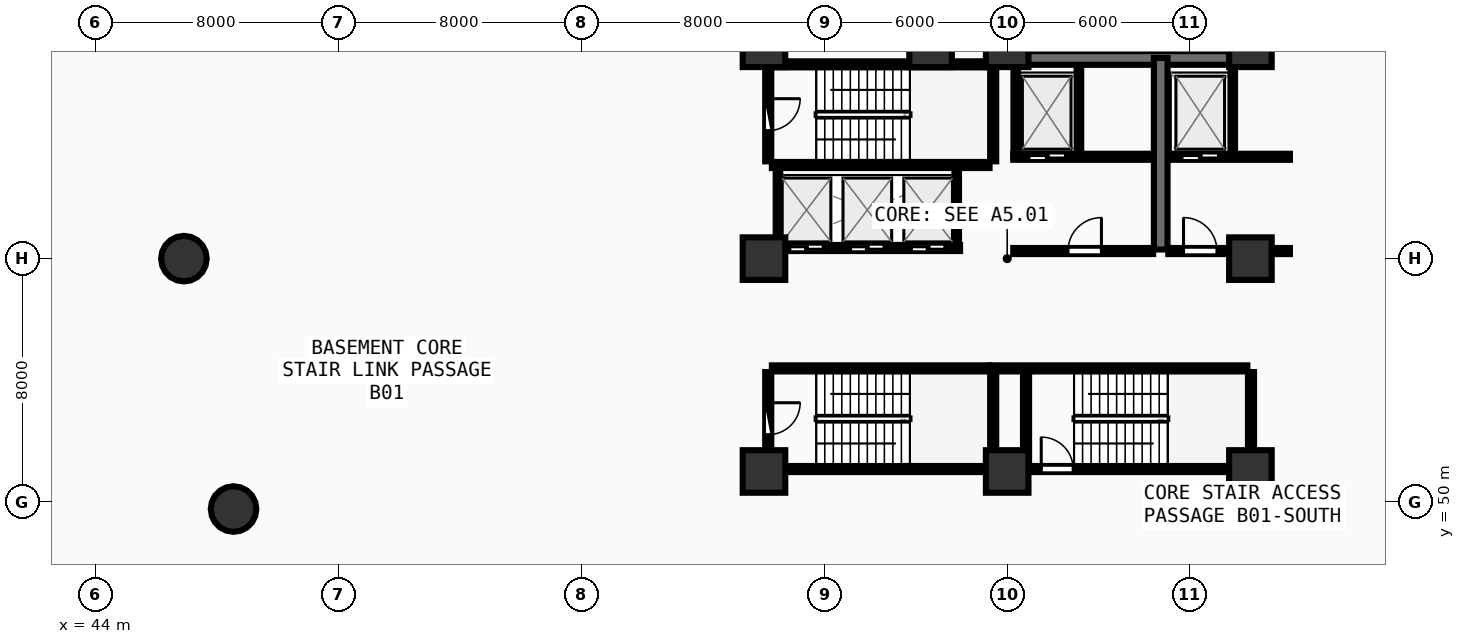
"""IFC4 building model, lengths in metres.
Left out: names, types, materials, properties, quantities, classifications, styles, units other than length and angle.
Written with IfcOpenShell. Run it as: python <this file> out.ifc"""

import sys

from ifc_helpers import new_model, si_unit, direction, frame, frame_2d, origin, origin_2d, place, context, subcontext, project, spatial, rectangle, circle, extrude, element, fill, save


model = new_model("IFC4")
c1 = context("Model", 3, precision=1e-05, world=origin(), true_north=direction((0.0, 1.0)))
c2 = subcontext(c1, "Body", "Model", "MODEL_VIEW")
j1 = project(units=[si_unit("LENGTHUNIT", "METRE"), si_unit("PLANEANGLEUNIT", "RADIAN")], contexts=[c1])
p1 = place(None, origin())
s1 = spatial("IfcSite", under=j1, at=p1, CompositionType="ELEMENT")
p2 = place(p1, origin())
s2 = spatial("IfcBuilding", under=s1, at=p2, CompositionType="ELEMENT")
p3 = place(p2, frame((0.0, 0.0, -4.2)))
s3 = spatial("IfcBuildingStorey", under=s2, at=p3, CompositionType="ELEMENT", Elevation=-4.2)
for number, where, z_axis, x_axis in (
    (1, (66.0, 51.0, 0.0), (0.0, 0.0, 1.0), (1.0, 0.0, 0.0)),
    (2, (74.0, 51.0, 0.0), (0.0, 0.0, 1.0), (1.0, 0.0, 0.0)),
    (3, (82.0, 51.0, 0.0), (0.0, 0.0, 1.0), (1.0, 0.0, 0.0)),
    (4, (82.0, 58.0, 0.0), (0.0, 0.0, 1.0), (1.0, 0.0, 0.0)),
    (5, (82.0, 65.0, 0.0), (0.0, 0.0, 1.0), (1.0, 0.0, 0.0)),
    (6, (74.0, 65.0, 0.0), (0.0, 0.0, 1.0), (1.0, 0.0, 0.0)),
    (7, (71.48, 65.0, 0.0), (0.0, 0.0, 1.0), (1.0, 0.0, 0.0)),
    (8, (66.0, 65.0, 0.0), (0.0, 0.0, 1.0), (1.0, 0.0, 0.0)),
    (9, (66.0, 58.0, 0.0), (0.0, 0.0, 1.0), (1.0, 0.0, 0.0)),
):
    element("IfcColumn", number, at=place(p3, frame(where, z_axis=z_axis, x_axis=x_axis)), inside=s3, PredefinedType="PILASTER", context=c2, shape_type="SweptSolid", body=[
        extrude(rectangle(XDim=1.4, YDim=1.4, at=origin_2d()), origin(), (0.0, 0.0, 1.0), 4.2),
    ])
for number, where, z_axis, x_axis in (
    (10, (46.92, 58.0, 0.0), (0.0, 0.0, 1.0), (1.0, 0.0, 0.0)),
    (11, (48.553, 49.764, 0.0), (0.0, 0.0, 1.0), (1.0, 0.0, 0.0)),
):
    element("IfcColumn", number, at=place(p3, frame(where, z_axis=z_axis, x_axis=x_axis)), inside=s3, PredefinedType="COLUMN", context=c2, shape_type="SweptSolid", body=[
        extrude(circle(Radius=0.75, at=origin_2d()), origin(), (0.0, 0.0, 1.0), 4.2),
    ])
p4 = place(p3, frame((66.26, 61.08, 0.0), z_axis=(0.0, 0.0, 1.0), x_axis=(1.0, 0.0, 0.0)))
e12 = element("IfcWall", 12, at=p4, inside=s3, PredefinedType="SHEAR", context=c2, shape_type="SweptSolid", body=[
    extrude(rectangle(XDim=7.16, YDim=0.2, at=frame_2d((3.58, 0.0))), origin(), (0.0, 0.0, 1.0), 3.9),
])
p5 = place(p3, frame((73.54, 61.2, 0.0), z_axis=(0.0, 0.0, 1.0), x_axis=(0.0, 1.0, 0.0)))
e13 = element("IfcWall", 13, at=p5, inside=s3, PredefinedType="SHEAR", context=c2, shape_type="SweptSolid", body=[
    extrude(rectangle(XDim=3.07, YDim=0.2, at=frame_2d((1.535, 0.0))), origin(), (0.0, 0.0, 1.0), 3.9),
])
p6 = place(p3, frame((73.42, 64.39, 0.0), z_axis=(0.0, 0.0, 1.0), x_axis=(-1.0, 0.0, 0.0)))
e14 = element("IfcWall", 14, at=p6, inside=s3, PredefinedType="SHEAR", context=c2, shape_type="SweptSolid", body=[
    extrude(rectangle(XDim=7.16, YDim=0.2, at=frame_2d((3.58, 0.0))), origin(), (0.0, 0.0, 1.0), 3.9),
])
p7 = place(p3, frame((66.14, 64.27, 0.0), z_axis=(0.0, 0.0, 1.0), x_axis=(0.0, -1.0, 0.0)))
e15 = element("IfcWall", 15, at=p7, inside=s3, PredefinedType="SHEAR", context=c2, shape_type="SweptSolid", body=[
    extrude(rectangle(XDim=3.07, YDim=0.2, at=frame_2d((1.535, 0.0))), origin(), (0.0, 0.0, 1.0), 3.9),
])
p8 = place(p7, frame((1.01, 0.0, 0.0)))
e16 = element("IfcOpeningElement", 16, at=p8, cuts=e15, PredefinedType="OPENING", context=c2, shape_type="SweptSolid", body=[
    extrude(rectangle(XDim=1.05, YDim=2.1, at=frame_2d((0.525, 1.05))), frame((0.0, 0.11, 0.0), z_axis=(0.0, -1.0, 0.0), x_axis=(1.0, 0.0, 0.0)), (0.0, 0.0, 1.0), 0.22),
])
p9 = place(p3, frame((74.0, 51.08, 0.0), z_axis=(0.0, 0.0, 1.0), x_axis=(1.0, 0.0, 0.0)))
e17 = element("IfcWall", 17, at=p9, inside=s3, PredefinedType="SHEAR", context=c2, shape_type="SweptSolid", body=[
    extrude(rectangle(XDim=7.9, YDim=0.2, at=frame_2d((3.95, 0.0))), origin(), (0.0, 0.0, 1.0), 3.9),
])
p10 = place(p9, frame((1.12, 0.0, 0.0)))
e18 = element("IfcOpeningElement", 18, at=p10, cuts=e17, PredefinedType="OPENING", context=c2, shape_type="SweptSolid", body=[
    extrude(rectangle(XDim=1.05, YDim=2.1, at=frame_2d((0.525, 1.05))), frame((0.0, 0.11, 0.0), z_axis=(0.0, -1.0, 0.0), x_axis=(1.0, 0.0, 0.0)), (0.0, 0.0, 1.0), 0.22),
])
p11 = place(p3, frame((82.02, 51.2, 0.0), z_axis=(0.0, 0.0, 1.0), x_axis=(0.0, 1.0, 0.0)))
e19 = element("IfcWall", 19, at=p11, inside=s3, PredefinedType="SHEAR", context=c2, shape_type="SweptSolid", body=[
    extrude(rectangle(XDim=3.07, YDim=0.2, at=frame_2d((1.535, 0.0))), origin(), (0.0, 0.0, 1.0), 3.9),
])
p12 = place(p3, frame((81.9, 54.39, 0.0), z_axis=(0.0, 0.0, 1.0), x_axis=(-1.0, 0.0, 0.0)))
e20 = element("IfcWall", 20, at=p12, inside=s3, PredefinedType="SHEAR", context=c2, shape_type="SweptSolid", body=[
    extrude(rectangle(XDim=8.46, YDim=0.2, at=frame_2d((4.23, 0.0))), origin(), (0.0, 0.0, 1.0), 3.9),
])
p13 = place(p3, frame((74.62, 54.27, 0.0), z_axis=(0.0, 0.0, 1.0), x_axis=(0.0, -1.0, 0.0)))
e21 = element("IfcWall", 21, at=p13, inside=s3, PredefinedType="SHEAR", context=c2, shape_type="SweptSolid", body=[
    extrude(rectangle(XDim=3.07, YDim=0.2, at=frame_2d((1.535, 0.0))), origin(), (0.0, 0.0, 1.0), 3.9),
])
p14 = place(p3, frame((66.26, 51.08, 0.0), z_axis=(0.0, 0.0, 1.0), x_axis=(1.0, 0.0, 0.0)))
e22 = element("IfcWall", 22, at=p14, inside=s3, PredefinedType="SHEAR", context=c2, shape_type="SweptSolid", body=[
    extrude(rectangle(XDim=7.16, YDim=0.2, at=frame_2d((3.58, 0.0))), origin(), (0.0, 0.0, 1.0), 3.9),
])
p15 = place(p3, frame((73.54, 51.2, 0.0), z_axis=(0.0, 0.0, 1.0), x_axis=(0.0, 1.0, 0.0)))
e23 = element("IfcWall", 23, at=p15, inside=s3, PredefinedType="SHEAR", context=c2, shape_type="SweptSolid", body=[
    extrude(rectangle(XDim=3.07, YDim=0.2, at=frame_2d((1.535, 0.0))), origin(), (0.0, 0.0, 1.0), 3.9),
])
p16 = place(p3, frame((73.42, 54.39, 0.0), z_axis=(0.0, 0.0, 1.0), x_axis=(-1.0, 0.0, 0.0)))
e24 = element("IfcWall", 24, at=p16, inside=s3, PredefinedType="SHEAR", context=c2, shape_type="SweptSolid", body=[
    extrude(rectangle(XDim=7.16, YDim=0.2, at=frame_2d((3.58, 0.0))), origin(), (0.0, 0.0, 1.0), 3.9),
])
p17 = place(p3, frame((66.14, 54.27, 0.0), z_axis=(0.0, 0.0, 1.0), x_axis=(0.0, -1.0, 0.0)))
e25 = element("IfcWall", 25, at=p17, inside=s3, PredefinedType="SHEAR", context=c2, shape_type="SweptSolid", body=[
    extrude(rectangle(XDim=3.07, YDim=0.2, at=frame_2d((1.535, 0.0))), origin(), (0.0, 0.0, 1.0), 3.9),
])
p18 = place(p17, frame((1.01, 0.0, 0.0)))
e26 = element("IfcOpeningElement", 26, at=p18, cuts=e25, PredefinedType="OPENING", context=c2, shape_type="SweptSolid", body=[
    extrude(rectangle(XDim=1.05, YDim=2.1, at=frame_2d((0.525, 1.05))), frame((0.0, 0.11, 0.0), z_axis=(0.0, -1.0, 0.0), x_axis=(1.0, 0.0, 0.0)), (0.0, 0.0, 1.0), 0.22),
])
p19 = place(p3, frame((74.0, 64.6, 0.0), z_axis=(0.0, 0.0, 1.0), x_axis=(1.0, 0.0, 0.0)))
e27 = element("IfcWall", 27, at=p19, inside=s3, PredefinedType="SHEAR", context=c2, shape_type="SweptSolid", body=[
    extrude(rectangle(XDim=8.0, YDim=0.45, at=frame_2d((4.0, 0.0))), origin(), (0.0, 0.0, 1.0), 3.9),
])
p20 = place(p3, frame((79.05, 58.3, 0.0), z_axis=(0.0, 0.0, 1.0), x_axis=(0.0, 1.0, 0.0)))
e28 = element("IfcWall", 28, at=p20, inside=s3, PredefinedType="SHEAR", context=c2, shape_type="SweptSolid", body=[
    extrude(rectangle(XDim=6.3, YDim=0.45, at=frame_2d((3.15, 0.0))), origin(), (0.0, 0.0, 1.0), 3.9),
])
p21 = place(p3, frame((74.2, 61.35, 0.0), z_axis=(0.0, 0.0, 1.0), x_axis=(1.0, 0.0, 0.0)))
e29 = element("IfcWall", 29, at=p21, inside=s3, PredefinedType="SOLIDWALL", context=c2, shape_type="SweptSolid", body=[
    extrude(rectangle(XDim=4.6, YDim=0.2, at=frame_2d((2.3, 0.0))), origin(), (0.0, 0.0, 1.0), 3.89),
])
p22 = place(p21, frame((0.52, 0.0, 0.0)))
e30 = element("IfcOpeningElement", 30, at=p22, cuts=e29, PredefinedType="OPENING", context=c2, shape_type="SweptSolid", body=[
    extrude(rectangle(XDim=1.2, YDim=2.15, at=frame_2d((0.6, 1.075))), frame((0.0, 0.11, 0.0), z_axis=(0.0, -1.0, 0.0), x_axis=(1.0, 0.0, 0.0)), (0.0, 0.0, 1.0), 0.22),
])
p23 = place(p3, frame((74.28, 61.35, 0.0), z_axis=(0.0, 0.0, 1.0), x_axis=(0.0, 1.0, 0.0)))
e31 = element("IfcWall", 31, at=p23, inside=s3, PredefinedType="PARTITIONING", context=c2, shape_type="SweptSolid", body=[
    extrude(rectangle(XDim=2.97, YDim=0.15, at=frame_2d((1.485, 0.0))), origin(), (0.0, 0.0, 1.0), 3.89),
])
p24 = place(p3, frame((76.36, 61.48, 0.0), z_axis=(0.0, 0.0, 1.0), x_axis=(0.0, 1.0, 0.0)))
e32 = element("IfcWall", 32, at=p24, inside=s3, PredefinedType="PARTITIONING", context=c2, shape_type="SweptSolid", body=[
    extrude(rectangle(XDim=2.84, YDim=0.15, at=frame_2d((1.42, 0.0))), origin(), (0.0, 0.0, 1.0), 3.89),
])
p25 = place(p3, frame((79.3, 61.35, 0.0), z_axis=(0.0, 0.0, 1.0), x_axis=(1.0, 0.0, 0.0)))
e33 = element("IfcWall", 33, at=p25, inside=s3, PredefinedType="SOLIDWALL", context=c2, shape_type="SweptSolid", body=[
    extrude(rectangle(XDim=4.0, YDim=0.2, at=frame_2d((2.0, 0.0))), origin(), (0.0, 0.0, 1.0), 3.185),
])
p26 = place(p25, frame((0.45, 0.0, 0.0)))
e34 = element("IfcOpeningElement", 34, at=p26, cuts=e33, PredefinedType="OPENING", context=c2, shape_type="SweptSolid", body=[
    extrude(rectangle(XDim=1.2, YDim=2.15, at=frame_2d((0.6, 1.075))), frame((0.0, 0.11, 0.0), z_axis=(0.0, -1.0, 0.0), x_axis=(1.0, 0.0, 0.0)), (0.0, 0.0, 1.0), 0.22),
])
p27 = place(p3, frame((81.42, 61.48, 0.0), z_axis=(0.0, 0.0, 1.0), x_axis=(0.0, 1.0, 0.0)))
e35 = element("IfcWall", 35, at=p27, inside=s3, PredefinedType="PARTITIONING", context=c2, shape_type="SweptSolid", body=[
    extrude(rectangle(XDim=2.84, YDim=0.15, at=frame_2d((1.42, 0.0))), origin(), (0.0, 0.0, 1.0), 3.89),
])
p28 = place(p3, frame((74.2, 58.25, 0.0), z_axis=(0.0, 0.0, 1.0), x_axis=(1.0, 0.0, 0.0)))
e36 = element("IfcWall", 36, at=p28, inside=s3, PredefinedType="SOLIDWALL", context=c2, shape_type="SweptSolid", body=[
    extrude(rectangle(XDim=4.6, YDim=0.2, at=frame_2d((2.3, 0.0))), origin(), (0.0, 0.0, 1.0), 3.89),
])
p29 = place(p28, frame((1.8, 0.0, 0.0)))
e37 = element("IfcOpeningElement", 37, at=p29, cuts=e36, PredefinedType="OPENING", context=c2, shape_type="SweptSolid", body=[
    extrude(rectangle(XDim=1.1, YDim=2.1, at=frame_2d((0.55, 1.05))), frame((0.0, 0.11, 0.0), z_axis=(0.0, -1.0, 0.0), x_axis=(1.0, 0.0, 0.0)), (0.0, 0.0, 1.0), 0.22),
])
p30 = place(p3, frame((79.3, 58.25, 0.0), z_axis=(0.0, 0.0, 1.0), x_axis=(1.0, 0.0, 0.0)))
e38 = element("IfcWall", 38, at=p30, inside=s3, PredefinedType="SOLIDWALL", context=c2, shape_type="SweptSolid", body=[
    extrude(rectangle(XDim=4.0, YDim=0.2, at=frame_2d((2.0, 0.0))), origin(), (0.0, 0.0, 1.0), 3.185),
])
p31 = place(p30, frame((0.5, 0.0, 0.0)))
e39 = element("IfcOpeningElement", 39, at=p31, cuts=e38, PredefinedType="OPENING", context=c2, shape_type="SweptSolid", body=[
    extrude(rectangle(XDim=1.1, YDim=2.1, at=frame_2d((0.55, 1.05))), frame((0.0, 0.11, 0.0), z_axis=(0.0, -1.0, 0.0), x_axis=(1.0, 0.0, 0.0)), (0.0, 0.0, 1.0), 0.22),
])
p32 = place(p3, frame((66.45, 58.35, 0.0), z_axis=(0.0, 0.0, 1.0), x_axis=(1.0, 0.0, 0.0)))
e40 = element("IfcWall", 40, at=p32, inside=s3, PredefinedType="SOLIDWALL", context=c2, shape_type="SweptSolid", body=[
    extrude(rectangle(XDim=6.0, YDim=0.2, at=frame_2d((3.0, 0.0))), origin(), (0.0, 0.0, 1.0), 3.89),
])
p33 = place(p32, frame((0.4, 0.0, 0.0)))
e41 = element("IfcOpeningElement", 41, at=p33, cuts=e40, PredefinedType="OPENING", context=c2, shape_type="SweptSolid", body=[
    extrude(rectangle(XDim=1.1, YDim=2.1, at=frame_2d((0.55, 1.05))), frame((0.0, 0.11, 0.0), z_axis=(0.0, -1.0, 0.0), x_axis=(1.0, 0.0, 0.0)), (0.0, 0.0, 1.0), 0.22),
])
p34 = place(p32, frame((2.4, 0.0, 0.0)))
e42 = element("IfcOpeningElement", 42, at=p34, cuts=e40, PredefinedType="OPENING", context=c2, shape_type="SweptSolid", body=[
    extrude(rectangle(XDim=1.1, YDim=2.1, at=frame_2d((0.55, 1.05))), frame((0.0, 0.11, 0.0), z_axis=(0.0, -1.0, 0.0), x_axis=(1.0, 0.0, 0.0)), (0.0, 0.0, 1.0), 0.22),
])
p35 = place(p32, frame((4.4, 0.0, 0.0)))
e43 = element("IfcOpeningElement", 43, at=p35, cuts=e40, PredefinedType="OPENING", context=c2, shape_type="SweptSolid", body=[
    extrude(rectangle(XDim=1.1, YDim=2.1, at=frame_2d((0.55, 1.05))), frame((0.0, 0.11, 0.0), z_axis=(0.0, -1.0, 0.0), x_axis=(1.0, 0.0, 0.0)), (0.0, 0.0, 1.0), 0.22),
])
for number, where, z_axis, x_axis in (
    (44, (66.46, 58.48, 0.0), (0.0, 0.0, 1.0), (0.0, 1.0, 0.0)),
    (45, (72.34, 58.48, 0.0), (0.0, 0.0, 1.0), (0.0, 1.0, 0.0)),
):
    element("IfcWall", number, at=place(p3, frame(where, z_axis=z_axis, x_axis=x_axis)), inside=s3, PredefinedType="PARTITIONING", context=c2, shape_type="SweptSolid", body=[
        extrude(rectangle(XDim=2.46, YDim=0.15, at=frame_2d((1.23, 0.0))), origin(), (0.0, 0.0, 1.0), 3.89),
    ])
p36 = place(p8, origin())
e46 = element("IfcDoor", 46, at=p36, inside=s3, OperationType="SINGLE_SWING_LEFT", PredefinedType="DOOR", context=c2, shape_type="SweptSolid", body=[
    extrude(rectangle(XDim=1.05, YDim=2.1, at=frame_2d((0.525, 1.05))), frame((0.0, 0.025, 0.0), z_axis=(0.0, -1.0, 0.0), x_axis=(1.0, 0.0, 0.0)), (0.0, 0.0, 1.0), 0.05),
])
fill(e16, e46)
p37 = place(p10, origin())
e47 = element("IfcDoor", 47, at=p37, inside=s3, OperationType="SINGLE_SWING_LEFT", PredefinedType="DOOR", context=c2, shape_type="SweptSolid", body=[
    extrude(rectangle(XDim=1.05, YDim=2.1, at=frame_2d((0.525, 1.05))), frame((0.0, 0.025, 0.0), z_axis=(0.0, -1.0, 0.0), x_axis=(1.0, 0.0, 0.0)), (0.0, 0.0, 1.0), 0.05),
])
fill(e18, e47)
p38 = place(p18, origin())
e48 = element("IfcDoor", 48, at=p38, inside=s3, OperationType="SINGLE_SWING_LEFT", PredefinedType="DOOR", context=c2, shape_type="SweptSolid", body=[
    extrude(rectangle(XDim=1.05, YDim=2.1, at=frame_2d((0.525, 1.05))), frame((0.0, 0.025, 0.0), z_axis=(0.0, -1.0, 0.0), x_axis=(1.0, 0.0, 0.0)), (0.0, 0.0, 1.0), 0.05),
])
fill(e26, e48)
p39 = place(p22, origin())
e49 = element("IfcDoor", 49, at=p39, inside=s3, OperationType="DOUBLE_DOOR_SLIDING", PredefinedType="DOOR", context=c2, shape_type="SweptSolid", body=[
    extrude(rectangle(XDim=1.2, YDim=2.15, at=frame_2d((0.6, 1.075))), frame((0.0, 0.025, 0.0), z_axis=(0.0, -1.0, 0.0), x_axis=(1.0, 0.0, 0.0)), (0.0, 0.0, 1.0), 0.05),
])
fill(e30, e49)
p40 = place(p26, origin())
e50 = element("IfcDoor", 50, at=p40, inside=s3, OperationType="DOUBLE_DOOR_SLIDING", PredefinedType="DOOR", context=c2, shape_type="SweptSolid", body=[
    extrude(rectangle(XDim=1.2, YDim=2.15, at=frame_2d((0.6, 1.075))), frame((0.0, 0.025, 0.0), z_axis=(0.0, -1.0, 0.0), x_axis=(1.0, 0.0, 0.0)), (0.0, 0.0, 1.0), 0.05),
])
fill(e34, e50)
p41 = place(p29, frame((1.1, 0.0, 0.0), z_axis=(0.0, 0.0, 1.0), x_axis=(-1.0, 0.0, 0.0)))
e51 = element("IfcDoor", 51, at=p41, inside=s3, OperationType="SINGLE_SWING_LEFT", PredefinedType="DOOR", context=c2, shape_type="SweptSolid", body=[
    extrude(rectangle(XDim=1.1, YDim=2.1, at=frame_2d((0.55, 1.05))), frame((0.0, 0.025, 0.0), z_axis=(0.0, -1.0, 0.0), x_axis=(1.0, 0.0, 0.0)), (0.0, 0.0, 1.0), 0.05),
])
fill(e37, e51)
p42 = place(p31, frame((1.1, 0.0, 0.0), z_axis=(0.0, 0.0, 1.0), x_axis=(-1.0, 0.0, 0.0)))
e52 = element("IfcDoor", 52, at=p42, inside=s3, OperationType="SINGLE_SWING_RIGHT", PredefinedType="DOOR", context=c2, shape_type="SweptSolid", body=[
    extrude(rectangle(XDim=1.1, YDim=2.1, at=frame_2d((0.55, 1.05))), frame((0.0, 0.025, 0.0), z_axis=(0.0, -1.0, 0.0), x_axis=(1.0, 0.0, 0.0)), (0.0, 0.0, 1.0), 0.05),
])
fill(e39, e52)
p43 = place(p33, origin())
e53 = element("IfcDoor", 53, at=p43, inside=s3, OperationType="DOUBLE_DOOR_SLIDING", PredefinedType="DOOR", context=c2, shape_type="SweptSolid", body=[
    extrude(rectangle(XDim=1.1, YDim=2.1, at=frame_2d((0.55, 1.05))), frame((0.0, 0.025, 0.0), z_axis=(0.0, -1.0, 0.0), x_axis=(1.0, 0.0, 0.0)), (0.0, 0.0, 1.0), 0.05),
])
fill(e41, e53)
p44 = place(p34, origin())
e54 = element("IfcDoor", 54, at=p44, inside=s3, OperationType="DOUBLE_DOOR_SLIDING", PredefinedType="DOOR", context=c2, shape_type="SweptSolid", body=[
    extrude(rectangle(XDim=1.1, YDim=2.1, at=frame_2d((0.55, 1.05))), frame((0.0, 0.025, 0.0), z_axis=(0.0, -1.0, 0.0), x_axis=(1.0, 0.0, 0.0)), (0.0, 0.0, 1.0), 0.05),
])
fill(e42, e54)
p45 = place(p35, origin())
e55 = element("IfcDoor", 55, at=p45, inside=s3, OperationType="DOUBLE_DOOR_SLIDING", PredefinedType="DOOR", context=c2, shape_type="SweptSolid", body=[
    extrude(rectangle(XDim=1.1, YDim=2.1, at=frame_2d((0.55, 1.05))), frame((0.0, 0.025, 0.0), z_axis=(0.0, -1.0, 0.0), x_axis=(1.0, 0.0, 0.0)), (0.0, 0.0, 1.0), 0.05),
])
fill(e43, e55)
save(model, sys.argv[1])
